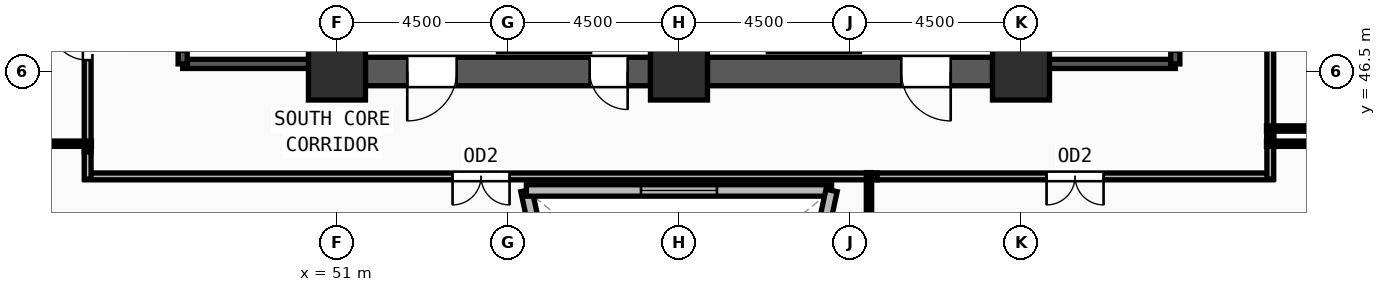
"""IFC4 building model, lengths in metres.
Left out: names, types, materials, properties, quantities, classifications, styles, units other than length and angle.
Written with IfcOpenShell. Run it as: python <this file> out.ifc"""

import sys

from ifc_helpers import new_model, si_unit, direction, frame, frame_2d, origin, origin_2d, place, context, subcontext, project, spatial, rectangle, extrude, source, transform, mapped, element, fill, save


model = new_model("IFC4")
c1 = context("Model", 3, precision=1e-05, world=origin(), true_north=direction((0.0, 1.0)))
c2 = subcontext(c1, "Body", "Model", "MODEL_VIEW")
j1 = project(units=[si_unit("LENGTHUNIT", "METRE"), si_unit("PLANEANGLEUNIT", "RADIAN")], contexts=[c1])
p1 = place(None, origin())
s1 = spatial("IfcSite", under=j1, at=p1, CompositionType="ELEMENT")
p2 = place(p1, origin())
s2 = spatial("IfcBuilding", under=s1, at=p2, CompositionType="ELEMENT")
p3 = place(p2, frame((0.0, 0.0, 144.0)))
s3 = spatial("IfcBuildingStorey", under=s2, at=p3, CompositionType="ELEMENT", Elevation=144.0)
m1 = source(origin(), c2, "Body", "SweptSolid", [
    extrude(rectangle(XDim=1.5, YDim=1.5, at=origin_2d()), origin(), (0.0, 0.0, 1.0), 3.75),
])
for number, where, z_axis, x_axis in (
    (1, (51.0, 46.5, 0.0), (0.0, 0.0, 1.0), (1.0, 0.0, 0.0)),
    (2, (60.0, 46.5, 0.0), (0.0, 0.0, 1.0), (1.0, 0.0, 0.0)),
    (3, (69.0, 46.5, 0.0), (0.0, 0.0, 1.0), (1.0, 0.0, 0.0)),
):
    element("IfcColumn", number, at=place(p3, frame(where, z_axis=z_axis, x_axis=x_axis)), inside=s3, PredefinedType="COLUMN", context=c2, shape_type="MappedRepresentation", body=[
        mapped(m1, transform((0.0, 0.0, 0.0), x_axis=(1.0, 0.0, 0.0), y_axis=(0.0, 1.0, 0.0), z_axis=(0.0, 0.0, 1.0), scale=1.0)),
    ])
p4 = place(p3, frame((66.188, 16.975, 0.0), z_axis=(0.0, 0.0, 1.0), x_axis=(0.550486590195, 0.834844005797, 0.0)))
e4 = element("IfcWall", 4, at=p4, inside=s3, PredefinedType="SOLIDWALL", context=c2, shape_type="SweptSolid", body=[
    extrude(rectangle(XDim=31.06, YDim=0.42, at=frame_2d((15.53, 0.0))), origin(), (0.0, 0.0, 1.0), 3.57),
])
m2 = source(origin(), c2, "Body", "SweptSolid", [
    extrude(rectangle(XDim=1.65, YDim=1.95, at=frame_2d((0.825, 0.975))), frame((0.0, 0.22, 0.0), z_axis=(0.0, -1.0, 0.0), x_axis=(1.0, 0.0, 0.0)), (0.0, 0.0, 1.0), 0.44),
])
p5 = place(p4, frame((6.94, 0.0, 0.55)))
e5 = element("IfcOpeningElement", 5, at=p5, cuts=e4, PredefinedType="OPENING", context=c2, shape_type="MappedRepresentation", body=[
    mapped(m2, transform((0.0, 0.0, 0.0), x_axis=(1.0, 0.0, 0.0), y_axis=(0.0, 1.0, 0.0), z_axis=(0.0, 0.0, 1.0), scale=1.0)),
])
p6 = place(p4, frame((14.705, 0.0, 0.55)))
e6 = element("IfcOpeningElement", 6, at=p6, cuts=e4, PredefinedType="OPENING", context=c2, shape_type="MappedRepresentation", body=[
    mapped(m2, transform((0.0, 0.0, 0.0), x_axis=(1.0, 0.0, 0.0), y_axis=(0.0, 1.0, 0.0), z_axis=(0.0, 0.0, 1.0), scale=1.0)),
])
p7 = place(p4, frame((22.47, 0.0, 0.55)))
e7 = element("IfcOpeningElement", 7, at=p7, cuts=e4, PredefinedType="OPENING", context=c2, shape_type="MappedRepresentation", body=[
    mapped(m2, transform((0.0, 0.0, 0.0), x_axis=(1.0, 0.0, 0.0), y_axis=(0.0, 1.0, 0.0), z_axis=(0.0, 0.0, 1.0), scale=1.0)),
])
p8 = place(p3, frame((68.25, 46.5, 0.0), z_axis=(0.0, 0.0, 1.0), x_axis=(-1.0, 0.0, 0.0)))
e8 = element("IfcWall", 8, at=p8, inside=s3, PredefinedType="SHEAR", context=c2, shape_type="SweptSolid", body=[
    extrude(rectangle(XDim=7.5, YDim=0.75, at=frame_2d((3.75, 0.0))), origin(), (0.0, 0.0, 1.0), 3.57),
])
m3 = source(origin(), c2, "Body", "SweptSolid", [
    extrude(rectangle(XDim=1.3, YDim=2.2, at=frame_2d((0.65, 1.1))), frame((0.0, 0.385, 0.0), z_axis=(0.0, -1.0, 0.0), x_axis=(1.0, 0.0, 0.0)), (0.0, 0.0, 1.0), 0.77),
])
p9 = place(p8, frame((1.1, 0.0, 0.0)))
e9 = element("IfcOpeningElement", 9, at=p9, cuts=e8, PredefinedType="OPENING", context=c2, shape_type="MappedRepresentation", body=[
    mapped(m3, transform((0.0, 0.0, 0.0), x_axis=(1.0, 0.0, 0.0), y_axis=(0.0, 1.0, 0.0), z_axis=(0.0, 0.0, 1.0), scale=1.0)),
])
p10 = place(p3, frame((59.25, 46.5, 0.0), z_axis=(0.0, 0.0, 1.0), x_axis=(-1.0, 0.0, 0.0)))
e10 = element("IfcWall", 10, at=p10, inside=s3, PredefinedType="SHEAR", context=c2, shape_type="SweptSolid", body=[
    extrude(rectangle(XDim=7.5, YDim=0.75, at=frame_2d((3.75, 0.0))), origin(), (0.0, 0.0, 1.0), 3.57),
])
p11 = place(p10, frame((5.1, 0.0, 0.0)))
e11 = element("IfcOpeningElement", 11, at=p11, cuts=e10, PredefinedType="OPENING", context=c2, shape_type="MappedRepresentation", body=[
    mapped(m3, transform((0.0, 0.0, 0.0), x_axis=(1.0, 0.0, 0.0), y_axis=(0.0, 1.0, 0.0), z_axis=(0.0, 0.0, 1.0), scale=1.0)),
])
m4 = source(origin(), c2, "Body", "SweptSolid", [
    extrude(rectangle(XDim=1.0, YDim=2.2, at=frame_2d((0.5, 1.1))), frame((0.0, 0.385, 0.0), z_axis=(0.0, -1.0, 0.0), x_axis=(1.0, 0.0, 0.0)), (0.0, 0.0, 1.0), 0.77),
])
p12 = place(p10, frame((0.6, 0.0, 0.0)))
e12 = element("IfcOpeningElement", 12, at=p12, cuts=e10, PredefinedType="OPENING", context=c2, shape_type="MappedRepresentation", body=[
    mapped(m4, transform((0.0, 0.0, 0.0), x_axis=(1.0, 0.0, 0.0), y_axis=(0.0, 1.0, 0.0), z_axis=(0.0, 0.0, 1.0), scale=1.0)),
])
p13 = place(p3, frame((46.94, 46.7, 0.0), z_axis=(0.0, 0.0, 1.0), x_axis=(1.0, 0.0, 0.0)))
e13 = element("IfcWall", 13, at=p13, inside=s3, PredefinedType="SOLIDWALL", context=c2, shape_type="SweptSolid", body=[
    extrude(rectangle(XDim=3.44, YDim=0.24, at=frame_2d((1.72, 0.0))), origin(), (0.0, 0.0, 1.0), 3.57),
])
p14 = place(p3, frame((50.38, 46.7, 0.0), z_axis=(0.0, 0.0, 1.0), x_axis=(0.0, 1.0, 0.0)))
e14 = element("IfcWall", 14, at=p14, inside=s3, PredefinedType="SOLIDWALL", context=c2, shape_type="SweptSolid", body=[
    extrude(rectangle(XDim=7.82, YDim=0.24, at=frame_2d((3.91, 0.0))), origin(), (0.0, 0.0, 1.0), 3.57),
])
p15 = place(p3, frame((46.94, 54.52, 0.0), z_axis=(0.0, 0.0, 1.0), x_axis=(0.0, -1.0, 0.0)))
e15 = element("IfcWall", 15, at=p15, inside=s3, PredefinedType="SOLIDWALL", context=c2, shape_type="SweptSolid", body=[
    extrude(rectangle(XDim=7.82, YDim=0.24, at=frame_2d((3.91, 0.0))), origin(), (0.0, 0.0, 1.0), 3.57),
])
m5 = source(origin(), c2, "Body", "SweptSolid", [
    extrude(rectangle(XDim=1.2, YDim=2.2, at=frame_2d((0.6, 1.1))), frame((0.0, 0.13, 0.0), z_axis=(0.0, -1.0, 0.0), x_axis=(1.0, 0.0, 0.0)), (0.0, 0.0, 1.0), 0.26),
])
p16 = place(p15, frame((6.3, 0.0, 0.0)))
e16 = element("IfcOpeningElement", 16, at=p16, cuts=e15, PredefinedType="OPENING", context=c2, shape_type="MappedRepresentation", body=[
    mapped(m5, transform((0.0, 0.0, 0.0), x_axis=(1.0, 0.0, 0.0), y_axis=(0.0, 1.0, 0.0), z_axis=(0.0, 0.0, 1.0), scale=1.0)),
])
p17 = place(p3, frame((69.62, 46.7, 0.0), z_axis=(0.0, 0.0, 1.0), x_axis=(1.0, 0.0, 0.0)))
e17 = element("IfcWall", 17, at=p17, inside=s3, PredefinedType="SOLIDWALL", context=c2, shape_type="SweptSolid", body=[
    extrude(rectangle(XDim=3.44, YDim=0.24, at=frame_2d((1.72, 0.0))), origin(), (0.0, 0.0, 1.0), 3.57),
])
p18 = place(p3, frame((73.06, 46.7, 0.0), z_axis=(0.0, 0.0, 1.0), x_axis=(0.0, 1.0, 0.0)))
e18 = element("IfcWall", 18, at=p18, inside=s3, PredefinedType="SOLIDWALL", context=c2, shape_type="SweptSolid", body=[
    extrude(rectangle(XDim=7.82, YDim=0.24, at=frame_2d((3.91, 0.0))), origin(), (0.0, 0.0, 1.0), 3.57),
])
p19 = place(p18, frame((0.32, 0.0, 0.0)))
e19 = element("IfcOpeningElement", 19, at=p19, cuts=e18, PredefinedType="OPENING", context=c2, shape_type="MappedRepresentation", body=[
    mapped(m5, transform((0.0, 0.0, 0.0), x_axis=(1.0, 0.0, 0.0), y_axis=(0.0, 1.0, 0.0), z_axis=(0.0, 0.0, 1.0), scale=1.0)),
])
p20 = place(p3, frame((69.62, 54.52, 0.0), z_axis=(0.0, 0.0, 1.0), x_axis=(0.0, -1.0, 0.0)))
e20 = element("IfcWall", 20, at=p20, inside=s3, PredefinedType="SOLIDWALL", context=c2, shape_type="SweptSolid", body=[
    extrude(rectangle(XDim=7.82, YDim=0.24, at=frame_2d((3.91, 0.0))), origin(), (0.0, 0.0, 1.0), 3.57),
])
p21 = place(p3, frame((57.39, 36.869, 0.0), z_axis=(0.0, 0.0, 1.0), x_axis=(-0.21138112539, 0.97740371384, 0.0)))
e21 = element("IfcWall", 21, at=p21, inside=s3, PredefinedType="SOLIDWALL", context=c2, shape_type="SweptSolid", body=[
    extrude(rectangle(XDim=6.652, YDim=0.3, at=frame_2d((3.326, 0.0))), origin(), (0.0, 0.0, 1.0), 3.57),
])
m6 = source(origin(), c2, "Body", "SweptSolid", [
    extrude(rectangle(XDim=2.0, YDim=1.9, at=frame_2d((1.0, 0.95))), frame((0.0, 0.16, 0.0), z_axis=(0.0, -1.0, 0.0), x_axis=(1.0, 0.0, 0.0)), (0.0, 0.0, 1.0), 0.32),
])
p22 = place(p21, frame((2.326, 0.0, 0.55)))
e22 = element("IfcOpeningElement", 22, at=p22, cuts=e21, PredefinedType="OPENING", context=c2, shape_type="MappedRepresentation", body=[
    mapped(m6, transform((0.0, 0.0, 0.0), x_axis=(1.0, 0.0, 0.0), y_axis=(0.0, 1.0, 0.0), z_axis=(0.0, 0.0, 1.0), scale=1.0)),
])
p23 = place(p3, frame((55.984, 43.37, 0.0), z_axis=(0.0, 0.0, 1.0), x_axis=(1.0, 0.0, 0.0)))
e23 = element("IfcWall", 23, at=p23, inside=s3, PredefinedType="SOLIDWALL", context=c2, shape_type="SweptSolid", body=[
    extrude(rectangle(XDim=8.032, YDim=0.3, at=frame_2d((4.016, 0.0))), origin(), (0.0, 0.0, 1.0), 3.57),
])
p24 = place(p23, frame((3.016, 0.0, 0.55)))
e24 = element("IfcOpeningElement", 24, at=p24, cuts=e23, PredefinedType="OPENING", context=c2, shape_type="MappedRepresentation", body=[
    mapped(m6, transform((0.0, 0.0, 0.0), x_axis=(1.0, 0.0, 0.0), y_axis=(0.0, 1.0, 0.0), z_axis=(0.0, 0.0, 1.0), scale=1.0)),
])
p25 = place(p3, frame((64.016, 43.37, 0.0), z_axis=(0.0, 0.0, 1.0), x_axis=(-0.21138112539, -0.97740371384, 0.0)))
e25 = element("IfcWall", 25, at=p25, inside=s3, PredefinedType="SOLIDWALL", context=c2, shape_type="SweptSolid", body=[
    extrude(rectangle(XDim=6.652, YDim=0.3, at=frame_2d((3.326, 0.0))), origin(), (0.0, 0.0, 1.0), 3.57),
])
p26 = place(p25, frame((2.326, 0.0, 0.55)))
e26 = element("IfcOpeningElement", 26, at=p26, cuts=e25, PredefinedType="OPENING", context=c2, shape_type="MappedRepresentation", body=[
    mapped(m6, transform((0.0, 0.0, 0.0), x_axis=(1.0, 0.0, 0.0), y_axis=(0.0, 1.0, 0.0), z_axis=(0.0, 0.0, 1.0), scale=1.0)),
])
p27 = place(p3, frame((44.44, 44.385, 0.0), z_axis=(0.0, 0.0, 1.0), x_axis=(0.0, 1.0, 0.0)))
e27 = element("IfcWall", 27, at=p27, inside=s3, PredefinedType="PARTITIONING", context=c2, shape_type="SweptSolid", body=[
    extrude(rectangle(XDim=5.83, YDim=0.18, at=frame_2d((2.915, 0.0))), origin(), (0.0, 0.0, 1.0), 3.57),
])
m7 = source(origin(), c2, "Body", "SweptSolid", [
    extrude(rectangle(XDim=1.0, YDim=2.2, at=frame_2d((0.5, 1.1))), frame((0.0, 0.1, 0.0), z_axis=(0.0, -1.0, 0.0), x_axis=(1.0, 0.0, 0.0)), (0.0, 0.0, 1.0), 0.2),
])
p28 = place(p27, frame((2.415, 0.0, 0.0)))
e28 = element("IfcOpeningElement", 28, at=p28, cuts=e27, PredefinedType="OPENING", context=c2, shape_type="MappedRepresentation", body=[
    mapped(m7, transform((0.0, 0.0, 0.0), x_axis=(1.0, 0.0, 0.0), y_axis=(0.0, 1.0, 0.0), z_axis=(0.0, 0.0, 1.0), scale=1.0)),
])
p29 = place(p3, frame((65.215, 43.74, 0.0), z_axis=(0.0, 0.0, 1.0), x_axis=(-1.0, 0.0, 0.0)))
e29 = element("IfcWall", 29, at=p29, inside=s3, PredefinedType="PARTITIONING", context=c2, shape_type="SweptSolid", body=[
    extrude(rectangle(XDim=20.845, YDim=0.18, at=frame_2d((10.422, 0.0))), origin(), (0.0, 0.0, 1.0), 3.57),
])
m8 = source(origin(), c2, "Body", "SweptSolid", [
    extrude(rectangle(XDim=1.5, YDim=2.2, at=frame_2d((0.75, 1.1))), frame((0.0, 0.1, 0.0), z_axis=(0.0, -1.0, 0.0), x_axis=(1.0, 0.0, 0.0)), (0.0, 0.0, 1.0), 0.2),
])
p30 = place(p29, frame((9.673, 0.0, 0.0)))
e30 = element("IfcOpeningElement", 30, at=p30, cuts=e29, PredefinedType="OPENING", context=c2, shape_type="MappedRepresentation", body=[
    mapped(m8, transform((0.0, 0.0, 0.0), x_axis=(1.0, 0.0, 0.0), y_axis=(0.0, 1.0, 0.0), z_axis=(0.0, 0.0, 1.0), scale=1.0)),
])
p31 = place(p3, frame((75.63, 43.74, 0.0), z_axis=(0.0, 0.0, 1.0), x_axis=(-1.0, 0.0, 0.0)))
e31 = element("IfcWall", 31, at=p31, inside=s3, PredefinedType="PARTITIONING", context=c2, shape_type="SweptSolid", body=[
    extrude(rectangle(XDim=10.415, YDim=0.18, at=frame_2d((5.208, 0.0))), origin(), (0.0, 0.0, 1.0), 3.57),
])
p32 = place(p31, frame((4.457, 0.0, 0.0)))
e32 = element("IfcOpeningElement", 32, at=p32, cuts=e31, PredefinedType="OPENING", context=c2, shape_type="MappedRepresentation", body=[
    mapped(m8, transform((0.0, 0.0, 0.0), x_axis=(1.0, 0.0, 0.0), y_axis=(0.0, 1.0, 0.0), z_axis=(0.0, 0.0, 1.0), scale=1.0)),
])
p33 = place(p3, frame((75.56, 52.715, 0.0), z_axis=(0.0, 0.0, 1.0), x_axis=(0.0, -1.0, 0.0)))
e33 = element("IfcWall", 33, at=p33, inside=s3, PredefinedType="PARTITIONING", context=c2, shape_type="SweptSolid", body=[
    extrude(rectangle(XDim=7.93, YDim=0.18, at=frame_2d((3.965, 0.0))), origin(), (0.0, 0.0, 1.0), 3.155),
])
p34 = place(p33, frame((3.465, 0.0, 0.0)))
e34 = element("IfcOpeningElement", 34, at=p34, cuts=e33, PredefinedType="OPENING", context=c2, shape_type="MappedRepresentation", body=[
    mapped(m7, transform((0.0, 0.0, 0.0), x_axis=(1.0, 0.0, 0.0), y_axis=(0.0, 1.0, 0.0), z_axis=(0.0, 0.0, 1.0), scale=1.0)),
])
p35 = place(p3, frame((44.44, 43.67, 0.0), z_axis=(0.0, 0.0, 1.0), x_axis=(0.0, 1.0, 0.0)))
e35 = element("IfcWall", 35, at=p35, inside=s3, PredefinedType="PARTITIONING", context=c2, shape_type="SweptSolid", body=[
    extrude(rectangle(XDim=0.715, YDim=0.18, at=frame_2d((0.357, 0.0))), origin(), (0.0, 0.0, 1.0), 3.57),
])
p36 = place(p3, frame((75.56, 44.785, 0.0), z_axis=(0.0, 0.0, 1.0), x_axis=(0.0, -1.0, 0.0)))
e36 = element("IfcWall", 36, at=p36, inside=s3, PredefinedType="PARTITIONING", context=c2, shape_type="SweptSolid", body=[
    extrude(rectangle(XDim=1.115, YDim=0.18, at=frame_2d((0.558, 0.0))), origin(), (0.0, 0.0, 1.0), 3.57),
])
p37 = place(p3, frame((44.54, 44.6, 0.0), z_axis=(0.0, 0.0, 1.0), x_axis=(-1.0, 0.0, 0.0)))
e37 = element("IfcWall", 37, at=p37, inside=s3, PredefinedType="PARTITIONING", context=c2, shape_type="SweptSolid", body=[
    extrude(rectangle(XDim=9.109, YDim=0.14, at=frame_2d((4.555, 0.0))), origin(), (0.0, 0.0, 1.0), 3.57),
])
p38 = place(p3, frame((75.46, 44.6, 0.0), z_axis=(0.0, 0.0, 1.0), x_axis=(1.0, 0.0, 0.0)))
e38 = element("IfcWall", 38, at=p38, inside=s3, PredefinedType="PARTITIONING", context=c2, shape_type="SweptSolid", body=[
    extrude(rectangle(XDim=9.451, YDim=0.14, at=frame_2d((4.726, 0.0))), origin(), (0.0, 0.0, 1.0), 3.57),
])
p39 = place(p3, frame((75.46, 45.0, 0.0), z_axis=(0.0, 0.0, 1.0), x_axis=(1.0, 0.0, 0.0)))
e39 = element("IfcWall", 39, at=p39, inside=s3, PredefinedType="PARTITIONING", context=c2, shape_type="SweptSolid", body=[
    extrude(rectangle(XDim=9.645, YDim=0.14, at=frame_2d((4.823, 0.0))), origin(), (0.0, 0.0, 1.0), 3.57),
])
p40 = place(p3, frame((65.0, 43.84, 0.0), z_axis=(0.0, 0.0, 1.0), x_axis=(0.0, -1.0, 0.0)))
e40 = element("IfcWall", 40, at=p40, inside=s3, PredefinedType="PARTITIONING", context=c2, shape_type="SweptSolid", body=[
    extrude(rectangle(XDim=27.893, YDim=0.14, at=frame_2d((13.947, 0.0))), origin(), (0.0, 0.0, 1.0), 3.57),
])
m9 = source(origin(), c2, "Body", "SweptSolid", [
    extrude(rectangle(XDim=1.3, YDim=2.2, at=frame_2d((0.65, 1.1))), frame((0.0, 0.025, 0.0), z_axis=(0.0, -1.0, 0.0), x_axis=(1.0, 0.0, 0.0)), (0.0, 0.0, 1.0), 0.05),
])
p41 = place(p11, origin())
e41 = element("IfcDoor", 41, at=p41, inside=s3, OperationType="SINGLE_SWING_RIGHT", PredefinedType="DOOR", context=c2, shape_type="MappedRepresentation", body=[
    mapped(m9, transform((0.0, 0.0, 0.0), x_axis=(1.0, 0.0, 0.0), y_axis=(0.0, 1.0, 0.0), z_axis=(0.0, 0.0, 1.0), scale=1.0)),
])
fill(e11, e41)
m10 = source(origin(), c2, "Body", "SweptSolid", [
    extrude(rectangle(XDim=1.0, YDim=2.2, at=frame_2d((0.5, 1.1))), frame((0.0, 0.025, 0.0), z_axis=(0.0, -1.0, 0.0), x_axis=(1.0, 0.0, 0.0)), (0.0, 0.0, 1.0), 0.05),
])
p42 = place(p12, origin())
e42 = element("IfcDoor", 42, at=p42, inside=s3, OperationType="SINGLE_SWING_LEFT", PredefinedType="DOOR", context=c2, shape_type="MappedRepresentation", body=[
    mapped(m10, transform((0.0, 0.0, 0.0), x_axis=(1.0, 0.0, 0.0), y_axis=(0.0, 1.0, 0.0), z_axis=(0.0, 0.0, 1.0), scale=1.0)),
])
fill(e12, e42)
p43 = place(p9, origin())
e43 = element("IfcDoor", 43, at=p43, inside=s3, OperationType="SINGLE_SWING_LEFT", PredefinedType="DOOR", context=c2, shape_type="MappedRepresentation", body=[
    mapped(m9, transform((0.0, 0.0, 0.0), x_axis=(1.0, 0.0, 0.0), y_axis=(0.0, 1.0, 0.0), z_axis=(0.0, 0.0, 1.0), scale=1.0)),
])
fill(e9, e43)
m11 = source(origin(), c2, "Body", "SweptSolid", [
    extrude(rectangle(XDim=2.0, YDim=1.9, at=frame_2d((1.0, 0.95))), frame((0.0, 0.03, 0.0), z_axis=(0.0, -1.0, 0.0), x_axis=(1.0, 0.0, 0.0)), (0.0, 0.0, 1.0), 0.06),
])
p44 = place(p24, origin())
e44 = element("IfcWindow", 44, at=p44, inside=s3, PartitioningType="DOUBLE_PANEL_VERTICAL", PredefinedType="WINDOW", context=c2, shape_type="MappedRepresentation", body=[
    mapped(m11, transform((0.0, 0.0, 0.0), x_axis=(1.0, 0.0, 0.0), y_axis=(0.0, 1.0, 0.0), z_axis=(0.0, 0.0, 1.0), scale=1.0)),
])
fill(e24, e44)
p45 = place(p28, origin())
e45 = element("IfcDoor", 45, at=p45, inside=s3, OperationType="SINGLE_SWING_RIGHT", PredefinedType="DOOR", context=c2, shape_type="MappedRepresentation", body=[
    mapped(m10, transform((0.0, 0.0, 0.0), x_axis=(1.0, 0.0, 0.0), y_axis=(0.0, 1.0, 0.0), z_axis=(0.0, 0.0, 1.0), scale=1.0)),
])
fill(e28, e45)
m12 = source(origin(), c2, "Body", "SweptSolid", [
    extrude(rectangle(XDim=1.5, YDim=2.2, at=frame_2d((0.75, 1.1))), frame((0.0, 0.025, 0.0), z_axis=(0.0, -1.0, 0.0), x_axis=(1.0, 0.0, 0.0)), (0.0, 0.0, 1.0), 0.05),
])
p46 = place(p30, origin())
e46 = element("IfcDoor", 46, at=p46, inside=s3, OperationType="DOUBLE_DOOR_SINGLE_SWING", PredefinedType="DOOR", context=c2, shape_type="MappedRepresentation", body=[
    mapped(m12, transform((0.0, 0.0, 0.0), x_axis=(1.0, 0.0, 0.0), y_axis=(0.0, 1.0, 0.0), z_axis=(0.0, 0.0, 1.0), scale=1.0)),
])
fill(e30, e46)
p47 = place(p32, origin())
e47 = element("IfcDoor", 47, at=p47, inside=s3, OperationType="DOUBLE_DOOR_SINGLE_SWING", PredefinedType="DOOR", context=c2, shape_type="MappedRepresentation", body=[
    mapped(m12, transform((0.0, 0.0, 0.0), x_axis=(1.0, 0.0, 0.0), y_axis=(0.0, 1.0, 0.0), z_axis=(0.0, 0.0, 1.0), scale=1.0)),
])
fill(e32, e47)
save(model, sys.argv[1])
